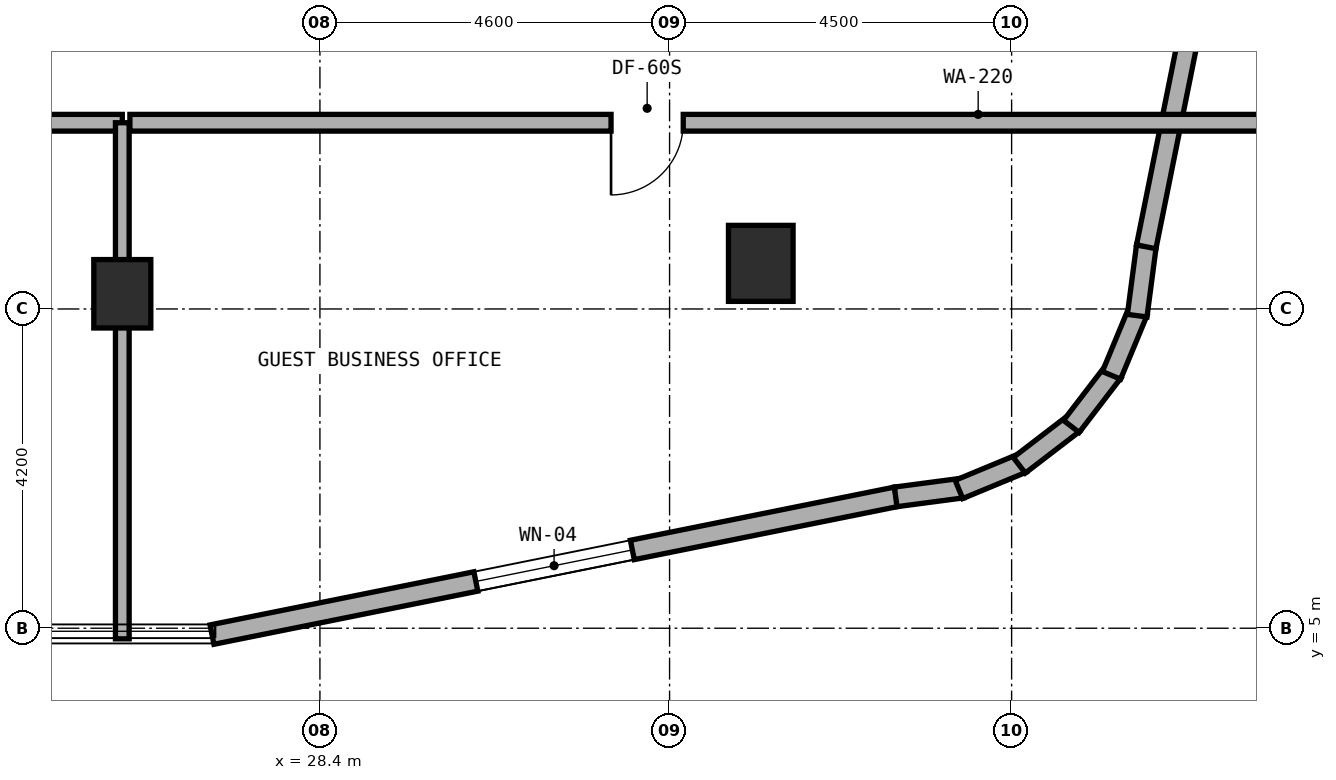
"""IFC4 building model, lengths in metres.
Left out: names, types, materials, properties, quantities, classifications, styles, units other than length and angle.
Written with IfcOpenShell. Run it as: python <this file> out.ifc"""

import sys

from ifc_helpers import new_model, si_unit, direction, frame, frame_2d, origin, origin_2d, place, context, subcontext, project, spatial, rectangle, extrude, element, fill, save


model = new_model("IFC4")
c1 = context("Model", 3, precision=1e-05, world=origin(), true_north=direction((0.0, 1.0)))
c2 = subcontext(c1, "Body", "Model", "MODEL_VIEW")
j1 = project(units=[si_unit("LENGTHUNIT", "METRE"), si_unit("PLANEANGLEUNIT", "RADIAN")], contexts=[c1])
p1 = place(None, origin())
s1 = spatial("IfcSite", under=j1, at=p1, CompositionType="ELEMENT")
p2 = place(p1, origin())
s2 = spatial("IfcBuilding", under=s1, at=p2, CompositionType="ELEMENT")
p3 = place(p2, frame((0.0, 0.0, 145.0)))
s3 = spatial("IfcBuildingStorey", under=s2, at=p3, CompositionType="ELEMENT", Elevation=145.0)
p4 = place(p3, frame((25.8, 9.4, 0.0), z_axis=(0.0, 0.0, 1.0), x_axis=(1.0, 0.0, 0.0)))
e1 = element("IfcColumn", 1, at=p4, inside=s3, PredefinedType="COLUMN", context=c2, shape_type="SweptSolid", body=[
    extrude(rectangle(XDim=0.75, YDim=0.9, at=origin_2d()), origin(), (0.0, 0.0, 1.0), 3.5),
])
p5 = place(p3, frame((34.2, 9.8, 0.0), z_axis=(0.0, 0.0, 1.0), x_axis=(1.0, 0.0, 0.0)))
e2 = element("IfcColumn", 2, at=p5, inside=s3, PredefinedType="COLUMN", context=c2, shape_type="SweptSolid", body=[
    extrude(rectangle(XDim=0.85, YDim=1.0, at=origin_2d()), origin(), (0.0, 0.0, 1.0), 3.5),
])
p6 = place(p3, frame((26.98, 4.916, 0.0), z_axis=(0.0, 0.0, 1.0), x_axis=(0.980315963543, 0.197435082048, 0.0)))
e3 = element("IfcWall", 3, at=p6, inside=s3, PredefinedType="STANDARD", context=c2, shape_type="SweptSolid", body=[
    extrude(rectangle(XDim=9.183, YDim=0.26, at=frame_2d((4.591, 0.0))), origin(), (0.0, 0.0, 1.0), 3.22),
])
p7 = place(p6, frame((3.541, 0.0, 0.85)))
e4 = element("IfcOpeningElement", 4, at=p7, cuts=e3, PredefinedType="OPENING", context=c2, shape_type="SweptSolid", body=[
    extrude(rectangle(XDim=2.1, YDim=1.5, at=frame_2d((1.05, 0.75))), frame((0.0, 0.14, 0.0), z_axis=(0.0, -1.0, 0.0), x_axis=(1.0, 0.0, 0.0)), (0.0, 0.0, 1.0), 0.28),
])
p8 = place(p3, frame((35.975, 6.728, 0.0), z_axis=(0.0, 0.0, 1.0), x_axis=(0.991388484223, 0.130953706898, 0.0)))
e5 = element("IfcWall", 5, at=p8, inside=s3, PredefinedType="STANDARD", context=c2, shape_type="SweptSolid", body=[
    extrude(rectangle(XDim=0.885, YDim=0.26, at=frame_2d((0.443, 0.0))), origin(), (0.0, 0.0, 1.0), 3.22),
])
p9 = place(p3, frame((36.807, 6.826, 0.0), z_axis=(0.0, 0.0, 1.0), x_axis=(0.923627776508, 0.383290660547, 0.0)))
e6 = element("IfcWall", 6, at=p9, inside=s3, PredefinedType="STANDARD", context=c2, shape_type="SweptSolid", body=[
    extrude(rectangle(XDim=0.903, YDim=0.26, at=frame_2d((0.452, 0.0))), origin(), (0.0, 0.0, 1.0), 3.22),
])
p10 = place(p3, frame((37.601, 7.144, 0.0), z_axis=(0.0, 0.0, 1.0), x_axis=(0.793458244748, 0.608624690463, 0.0)))
e7 = element("IfcWall", 7, at=p10, inside=s3, PredefinedType="STANDARD", context=c2, shape_type="SweptSolid", body=[
    extrude(rectangle(XDim=0.902, YDim=0.26, at=frame_2d((0.451, 0.0))), origin(), (0.0, 0.0, 1.0), 3.22),
])
p11 = place(p3, frame((38.286, 7.655, 0.0), z_axis=(0.0, 0.0, 1.0), x_axis=(0.608494022858, 0.793558456666, 0.0)))
e8 = element("IfcWall", 8, at=p11, inside=s3, PredefinedType="STANDARD", context=c2, shape_type="SweptSolid", body=[
    extrude(rectangle(XDim=0.902, YDim=0.26, at=frame_2d((0.451, 0.0))), origin(), (0.0, 0.0, 1.0), 3.22),
])
p12 = place(p3, frame((38.814, 8.327, 0.0), z_axis=(0.0, 0.0, 1.0), x_axis=(0.383155708213, 0.923683767999, 0.0)))
e9 = element("IfcWall", 9, at=p12, inside=s3, PredefinedType="STANDARD", context=c2, shape_type="SweptSolid", body=[
    extrude(rectangle(XDim=0.903, YDim=0.26, at=frame_2d((0.451, 0.0))), origin(), (0.0, 0.0, 1.0), 3.22),
])
p13 = place(p3, frame((39.152, 9.112, 0.0), z_axis=(0.0, 0.0, 1.0), x_axis=(0.130200706103, 0.991487658083, 0.0)))
e10 = element("IfcWall", 10, at=p13, inside=s3, PredefinedType="STANDARD", context=c2, shape_type="SweptSolid", body=[
    extrude(rectangle(XDim=0.921, YDim=0.26, at=frame_2d((0.46, 0.0))), origin(), (0.0, 0.0, 1.0), 3.22),
])
p14 = place(p3, frame((39.271, 10.018, 0.0), z_axis=(0.0, 0.0, 1.0), x_axis=(0.197435082048, 0.980315963543, 0.0)))
e11 = element("IfcWall", 11, at=p14, inside=s3, PredefinedType="STANDARD", context=c2, shape_type="SweptSolid", body=[
    extrude(rectangle(XDim=9.183, YDim=0.26, at=frame_2d((4.591, 0.0))), origin(), (0.0, 0.0, 1.0), 3.22),
])
p15 = place(p14, frame((5.349, 0.0, 0.85)))
e12 = element("IfcOpeningElement", 12, at=p15, cuts=e11, PredefinedType="OPENING", context=c2, shape_type="SweptSolid", body=[
    extrude(rectangle(XDim=2.1, YDim=1.5, at=frame_2d((1.05, 0.75))), frame((0.0, 0.14, 0.0), z_axis=(0.0, -1.0, 0.0), x_axis=(1.0, 0.0, 0.0)), (0.0, 0.0, 1.0), 0.28),
])
p16 = place(p3, frame((18.4, 11.65, 0.0), z_axis=(0.0, 0.0, 1.0), x_axis=(1.0, 0.0, 0.0)))
e13 = element("IfcWall", 13, at=p16, inside=s3, PredefinedType="SOLIDWALL", context=c2, shape_type="SweptSolid", body=[
    extrude(rectangle(XDim=7.4, YDim=0.22, at=frame_2d((3.7, 0.0))), origin(), (0.0, 0.0, 1.0), 2.795),
])
p17 = place(p16, frame((3.225, 0.0, 0.0)))
e14 = element("IfcOpeningElement", 14, at=p17, cuts=e13, PredefinedType="OPENING", context=c2, shape_type="SweptSolid", body=[
    extrude(rectangle(XDim=0.95, YDim=2.1, at=frame_2d((0.475, 1.05))), frame((0.0, 0.12, 0.0), z_axis=(0.0, -1.0, 0.0), x_axis=(1.0, 0.0, 0.0)), (0.0, 0.0, 1.0), 0.24),
])
p18 = place(p3, frame((25.8, 4.86, 0.0), z_axis=(0.0, 0.0, 1.0), x_axis=(0.0, 1.0, 0.0)))
e15 = element("IfcWall", 15, at=p18, inside=s3, PredefinedType="SOLIDWALL", context=c2, shape_type="SweptSolid", body=[
    extrude(rectangle(XDim=6.79, YDim=0.18, at=frame_2d((3.395, 0.0))), origin(), (0.0, 0.0, 1.0), 2.795),
])
p19 = place(p3, frame((25.9, 11.65, 0.0), z_axis=(0.0, 0.0, 1.0), x_axis=(1.0, 0.0, 0.0)))
e16 = element("IfcWall", 16, at=p19, inside=s3, PredefinedType="SOLIDWALL", context=c2, shape_type="SweptSolid", body=[
    extrude(rectangle(XDim=15.04, YDim=0.22, at=frame_2d((7.52, 0.0))), origin(), (0.0, 0.0, 1.0), 2.795),
])
p20 = place(p19, frame((6.33, 0.0, 0.0)))
e17 = element("IfcOpeningElement", 17, at=p20, cuts=e16, PredefinedType="OPENING", context=c2, shape_type="SweptSolid", body=[
    extrude(rectangle(XDim=0.95, YDim=2.1, at=frame_2d((0.475, 1.05))), frame((0.0, 0.12, 0.0), z_axis=(0.0, -1.0, 0.0), x_axis=(1.0, 0.0, 0.0)), (0.0, 0.0, 1.0), 0.24),
])
p21 = place(p7, origin())
e18 = element("IfcWindow", 18, at=p21, inside=s3, PartitioningType="SINGLE_PANEL", PredefinedType="WINDOW", context=c2, shape_type="SweptSolid", body=[
    extrude(rectangle(XDim=2.1, YDim=1.5, at=frame_2d((1.05, 0.75))), frame((0.0, 0.03, 0.0), z_axis=(0.0, -1.0, 0.0), x_axis=(1.0, 0.0, 0.0)), (0.0, 0.0, 1.0), 0.06),
])
fill(e4, e18)
p22 = place(p20, frame((0.95, 0.0, 0.0), z_axis=(0.0, 0.0, 1.0), x_axis=(-1.0, 0.0, 0.0)))
e19 = element("IfcDoor", 19, at=p22, inside=s3, OperationType="SINGLE_SWING_RIGHT", PredefinedType="DOOR", context=c2, shape_type="SweptSolid", body=[
    extrude(rectangle(XDim=0.95, YDim=2.1, at=frame_2d((0.475, 1.05))), frame((0.0, 0.025, 0.0), z_axis=(0.0, -1.0, 0.0), x_axis=(1.0, 0.0, 0.0)), (0.0, 0.0, 1.0), 0.05),
])
fill(e17, e19)
save(model, sys.argv[1])
